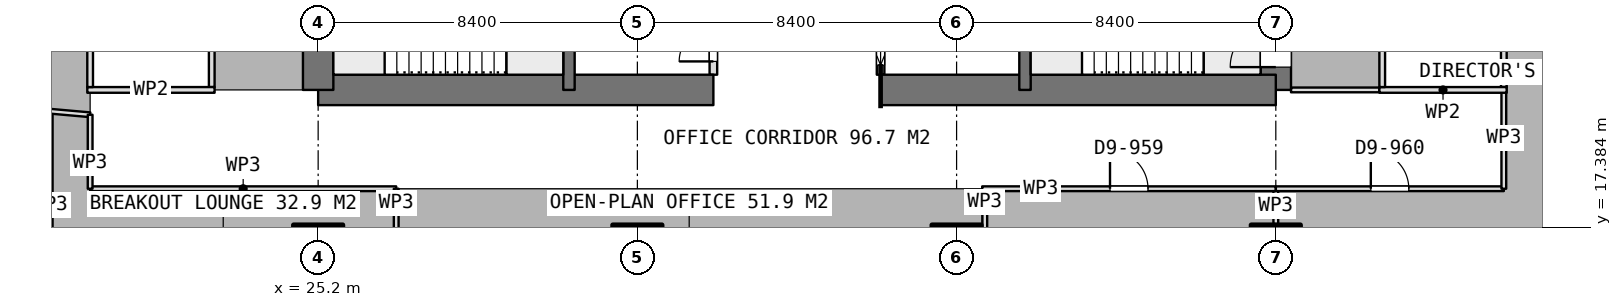
"""IFC4 building model, lengths in metres.
Left out: names, types, materials, properties, quantities, classifications, styles, units other than length and angle.
Written with IfcOpenShell. Run it as: python <this file> out.ifc"""

import sys

from ifc_helpers import new_model, si_unit, direction, frame, frame_2d, origin, origin_2d, place, context, subcontext, project, spatial, rectangle, extrude, element, fill, save


model = new_model("IFC4")
c1 = context("Model", 3, precision=1e-05, world=origin(), true_north=direction((0.0, 1.0)))
c2 = subcontext(c1, "Body", "Model", "MODEL_VIEW")
j1 = project(units=[si_unit("LENGTHUNIT", "METRE"), si_unit("PLANEANGLEUNIT", "RADIAN")], contexts=[c1])
p1 = place(None, origin())
s1 = spatial("IfcSite", under=j1, at=p1, CompositionType="ELEMENT")
p2 = place(p1, origin())
s2 = spatial("IfcBuilding", under=s1, at=p2, CompositionType="ELEMENT")
p3 = place(p2, frame((0.0, 0.0, 257.6)))
s3 = spatial("IfcBuildingStorey", under=s2, at=p3, CompositionType="ELEMENT", Elevation=257.6)
p4 = place(p3, frame((25.2, 21.0, 0.0), z_axis=(0.0, 0.0, 1.0), x_axis=(1.0, 0.0, 0.0)))
e1 = element("IfcWall", 1, at=p4, inside=s3, PredefinedType="SHEAR", context=c2, shape_type="SweptSolid", body=[
    extrude(rectangle(XDim=10.4, YDim=0.8, at=frame_2d((5.2, 0.0))), origin(), (0.0, 0.0, 1.0), 3.75),
])
p5 = place(p3, frame((40.0, 21.0, 0.0), z_axis=(0.0, 0.0, 1.0), x_axis=(1.0, 0.0, 0.0)))
e2 = element("IfcWall", 2, at=p5, inside=s3, PredefinedType="SHEAR", context=c2, shape_type="SweptSolid", body=[
    extrude(rectangle(XDim=10.4, YDim=0.8, at=frame_2d((5.2, 0.0))), origin(), (0.0, 0.0, 1.0), 3.75),
])
p6 = place(p3, frame((25.2, 21.0, 0.0), z_axis=(0.0, 0.0, 1.0), x_axis=(0.0, 1.0, 0.0)))
e3 = element("IfcWall", 3, at=p6, inside=s3, PredefinedType="SHEAR", context=c2, shape_type="SweptSolid", body=[
    extrude(rectangle(XDim=25.2, YDim=0.8, at=frame_2d((12.6, 0.0))), origin(), (0.0, 0.0, 1.0), 3.75),
])
p7 = place(p6, frame((7.8, 0.0, 0.0)))
e4 = element("IfcOpeningElement", 4, at=p7, cuts=e3, PredefinedType="OPENING", context=c2, shape_type="SweptSolid", body=[
    extrude(rectangle(XDim=1.2, YDim=2.1, at=frame_2d((0.6, 1.05))), frame((0.0, 0.41, 0.0), z_axis=(0.0, -1.0, 0.0), x_axis=(1.0, 0.0, 0.0)), (0.0, 0.0, 1.0), 0.82),
])
p8 = place(p6, frame((14.25, 0.0, 0.0)))
e5 = element("IfcOpeningElement", 5, at=p8, cuts=e3, PredefinedType="OPENING", context=c2, shape_type="SweptSolid", body=[
    extrude(rectangle(XDim=0.9, YDim=2.1, at=frame_2d((0.45, 1.05))), frame((0.0, 0.41, 0.0), z_axis=(0.0, -1.0, 0.0), x_axis=(1.0, 0.0, 0.0)), (0.0, 0.0, 1.0), 0.82),
])
p9 = place(p6, frame((16.85, 0.0, 0.0)))
e6 = element("IfcOpeningElement", 6, at=p9, cuts=e3, PredefinedType="OPENING", context=c2, shape_type="SweptSolid", body=[
    extrude(rectangle(XDim=0.9, YDim=2.1, at=frame_2d((0.45, 1.05))), frame((0.0, 0.41, 0.0), z_axis=(0.0, -1.0, 0.0), x_axis=(1.0, 0.0, 0.0)), (0.0, 0.0, 1.0), 0.82),
])
p10 = place(p6, frame((18.95, 0.0, 0.0)))
e7 = element("IfcOpeningElement", 7, at=p10, cuts=e3, PredefinedType="OPENING", context=c2, shape_type="SweptSolid", body=[
    extrude(rectangle(XDim=1.2, YDim=2.1, at=frame_2d((0.6, 1.05))), frame((0.0, 0.41, 0.0), z_axis=(0.0, -1.0, 0.0), x_axis=(1.0, 0.0, 0.0)), (0.0, 0.0, 1.0), 0.82),
])
p11 = place(p3, frame((50.4, 21.0, 0.0), z_axis=(0.0, 0.0, 1.0), x_axis=(0.0, 1.0, 0.0)))
e8 = element("IfcWall", 8, at=p11, inside=s3, PredefinedType="SHEAR", context=c2, shape_type="SweptSolid", body=[
    extrude(rectangle(XDim=25.2, YDim=0.8, at=frame_2d((12.6, 0.0))), origin(), (0.0, 0.0, 1.0), 3.75),
])
p12 = place(p11, frame((16.2, 0.0, 0.0)))
e9 = element("IfcOpeningElement", 9, at=p12, cuts=e8, PredefinedType="OPENING", context=c2, shape_type="SweptSolid", body=[
    extrude(rectangle(XDim=1.2, YDim=2.1, at=frame_2d((0.6, 1.05))), frame((0.0, 0.41, 0.0), z_axis=(0.0, -1.0, 0.0), x_axis=(1.0, 0.0, 0.0)), (0.0, 0.0, 1.0), 0.82),
])
p13 = place(p11, frame((10.05, 0.0, 0.0)))
e10 = element("IfcOpeningElement", 10, at=p13, cuts=e8, PredefinedType="OPENING", context=c2, shape_type="SweptSolid", body=[
    extrude(rectangle(XDim=0.9, YDim=2.1, at=frame_2d((0.45, 1.05))), frame((0.0, 0.41, 0.0), z_axis=(0.0, -1.0, 0.0), x_axis=(1.0, 0.0, 0.0)), (0.0, 0.0, 1.0), 0.82),
])
p14 = place(p11, frame((7.45, 0.0, 0.0)))
e11 = element("IfcOpeningElement", 11, at=p14, cuts=e8, PredefinedType="OPENING", context=c2, shape_type="SweptSolid", body=[
    extrude(rectangle(XDim=0.9, YDim=2.1, at=frame_2d((0.45, 1.05))), frame((0.0, 0.41, 0.0), z_axis=(0.0, -1.0, 0.0), x_axis=(1.0, 0.0, 0.0)), (0.0, 0.0, 1.0), 0.82),
])
p15 = place(p11, frame((0.6, 0.0, 0.0)))
e12 = element("IfcOpeningElement", 12, at=p15, cuts=e8, PredefinedType="OPENING", context=c2, shape_type="SweptSolid", body=[
    extrude(rectangle(XDim=1.2, YDim=2.1, at=frame_2d((0.6, 1.05))), frame((0.0, 0.41, 0.0), z_axis=(0.0, -1.0, 0.0), x_axis=(1.0, 0.0, 0.0)), (0.0, 0.0, 1.0), 0.82),
])
for number, where, z_axis, x_axis in (
    (13, (31.8, 21.0, 0.0), (0.0, 0.0, 1.0), (0.0, 1.0, 0.0)),
    (14, (43.8, 21.0, 0.0), (0.0, 0.0, 1.0), (0.0, 1.0, 0.0)),
):
    element("IfcWall", number, at=place(p3, frame(where, z_axis=z_axis, x_axis=x_axis)), inside=s3, PredefinedType="SHEAR", context=c2, shape_type="SweptSolid", body=[
        extrude(rectangle(XDim=25.2, YDim=0.3, at=frame_2d((12.6, 0.0))), origin(), (0.0, 0.0, 1.0), 3.75),
    ])
for number, where, z_axis, x_axis in (
    (15, (25.2, 16.8, 0.0), (0.0, 0.0, 1.0), (1.0, 0.0, 0.0)),
    (16, (33.6, 16.8, 0.0), (0.0, 0.0, 1.0), (1.0, 0.0, 0.0)),
    (17, (42.0, 16.8, 0.0), (0.0, 0.0, 1.0), (1.0, 0.0, 0.0)),
    (18, (50.4, 16.8, 0.0), (0.0, 0.0, 1.0), (1.0, 0.0, 0.0)),
):
    element("IfcColumn", number, at=place(p3, frame(where, z_axis=z_axis, x_axis=x_axis)), inside=s3, PredefinedType="COLUMN", context=c2, shape_type="SweptSolid", body=[
        extrude(rectangle(XDim=1.3, YDim=1.3, at=origin_2d()), origin(), (0.0, 0.0, 1.0), 3.75),
    ])
p16 = place(p3, frame((40.0, 21.4, 0.0), z_axis=(0.0, 0.0, 1.0), x_axis=(0.0, 1.0, 0.0)))
e19 = element("IfcWall", 19, at=p16, inside=s3, PredefinedType="PARTITIONING", context=c2, shape_type="SweptSolid", body=[
    extrude(rectangle(XDim=1.85, YDim=0.2, at=frame_2d((0.925, 0.0))), origin(), (0.0, 0.0, 1.0), 3.5),
])
p17 = place(p16, frame((0.25, 0.0, 0.0)))
e20 = element("IfcOpeningElement", 20, at=p17, cuts=e19, PredefinedType="OPENING", context=c2, shape_type="SweptSolid", body=[
    extrude(rectangle(XDim=1.1, YDim=2.1, at=frame_2d((0.55, 1.05))), frame((0.0, 0.11, 0.0), z_axis=(0.0, -1.0, 0.0), x_axis=(1.0, 0.0, 0.0)), (0.0, 0.0, 1.0), 0.22),
])
p18 = place(p3, frame((35.6, 21.4, 0.0), z_axis=(0.0, 0.0, 1.0), x_axis=(0.0, 1.0, 0.0)))
e21 = element("IfcWall", 21, at=p18, inside=s3, PredefinedType="PARTITIONING", context=c2, shape_type="SweptSolid", body=[
    extrude(rectangle(XDim=1.85, YDim=0.2, at=frame_2d((0.925, 0.0))), origin(), (0.0, 0.0, 1.0), 3.5),
])
p19 = place(p18, frame((0.35, 0.0, 0.0)))
e22 = element("IfcOpeningElement", 22, at=p19, cuts=e21, PredefinedType="OPENING", context=c2, shape_type="SweptSolid", body=[
    extrude(rectangle(XDim=0.9, YDim=2.1, at=frame_2d((0.45, 1.05))), frame((0.0, 0.11, 0.0), z_axis=(0.0, -1.0, 0.0), x_axis=(1.0, 0.0, 0.0)), (0.0, 0.0, 1.0), 0.22),
])
p20 = place(p3, frame((19.125, 21.0, 0.0), z_axis=(0.0, 0.0, 1.0), x_axis=(1.0, 0.0, 0.0)))
e23 = element("IfcWall", 23, at=p20, inside=s3, PredefinedType="PARTITIONING", context=c2, shape_type="SweptSolid", body=[
    extrude(rectangle(XDim=3.35, YDim=0.15, at=frame_2d((1.675, 0.0))), origin(), (0.0, 0.0, 1.0), 3.5),
])
p21 = place(p3, frame((19.2, 21.075, 0.0), z_axis=(0.0, 0.0, 1.0), x_axis=(0.0, 1.0, 0.0)))
e24 = element("IfcWall", 24, at=p21, inside=s3, PredefinedType="PARTITIONING", context=c2, shape_type="SweptSolid", body=[
    extrude(rectangle(XDim=6.85, YDim=0.15, at=frame_2d((3.425, 0.0))), origin(), (0.0, 0.0, 1.0), 3.5),
])
p22 = place(p3, frame((22.4, 21.075, 0.0), z_axis=(0.0, 0.0, 1.0), x_axis=(0.0, 1.0, 0.0)))
e25 = element("IfcWall", 25, at=p22, inside=s3, PredefinedType="PARTITIONING", context=c2, shape_type="SweptSolid", body=[
    extrude(rectangle(XDim=6.85, YDim=0.15, at=frame_2d((3.425, 0.0))), origin(), (0.0, 0.0, 1.0), 3.5),
])
p23 = place(p22, frame((2.925, 0.0, 0.0)))
e26 = element("IfcOpeningElement", 26, at=p23, cuts=e25, PredefinedType="OPENING", context=c2, shape_type="SweptSolid", body=[
    extrude(rectangle(XDim=1.0, YDim=2.1, at=frame_2d((0.5, 1.05))), frame((0.0, 0.085, 0.0), z_axis=(0.0, -1.0, 0.0), x_axis=(1.0, 0.0, 0.0)), (0.0, 0.0, 1.0), 0.17),
])
p24 = place(p3, frame((53.125, 21.0, 0.0), z_axis=(0.0, 0.0, 1.0), x_axis=(1.0, 0.0, 0.0)))
e27 = element("IfcWall", 27, at=p24, inside=s3, PredefinedType="PARTITIONING", context=c2, shape_type="SweptSolid", body=[
    extrude(rectangle(XDim=3.35, YDim=0.15, at=frame_2d((1.675, 0.0))), origin(), (0.0, 0.0, 1.0), 3.5),
])
p25 = place(p3, frame((53.2, 21.075, 0.0), z_axis=(0.0, 0.0, 1.0), x_axis=(0.0, 1.0, 0.0)))
e28 = element("IfcWall", 28, at=p25, inside=s3, PredefinedType="PARTITIONING", context=c2, shape_type="SweptSolid", body=[
    extrude(rectangle(XDim=6.85, YDim=0.15, at=frame_2d((3.425, 0.0))), origin(), (0.0, 0.0, 1.0), 3.5),
])
p26 = place(p25, frame((2.925, 0.0, 0.0)))
e29 = element("IfcOpeningElement", 29, at=p26, cuts=e28, PredefinedType="OPENING", context=c2, shape_type="SweptSolid", body=[
    extrude(rectangle(XDim=1.0, YDim=2.1, at=frame_2d((0.5, 1.05))), frame((0.0, 0.085, 0.0), z_axis=(0.0, -1.0, 0.0), x_axis=(1.0, 0.0, 0.0)), (0.0, 0.0, 1.0), 0.17),
])
p27 = place(p3, frame((56.4, 21.075, 0.0), z_axis=(0.0, 0.0, 1.0), x_axis=(0.0, 1.0, 0.0)))
e30 = element("IfcWall", 30, at=p27, inside=s3, PredefinedType="PARTITIONING", context=c2, shape_type="SweptSolid", body=[
    extrude(rectangle(XDim=6.85, YDim=0.15, at=frame_2d((3.425, 0.0))), origin(), (0.0, 0.0, 1.0), 3.5),
])
p28 = place(p3, frame((50.4, 18.4, 0.0), z_axis=(0.0, 0.0, 1.0), x_axis=(0.0, -1.0, 0.0)))
e31 = element("IfcWall", 31, at=p28, inside=s3, PredefinedType="PARTITIONING", context=c2, shape_type="SweptSolid", body=[
    extrude(rectangle(XDim=0.93, YDim=0.125, at=frame_2d((0.465, 0.0))), origin(), (0.0, 0.0, 1.0), 3.5),
])
p29 = place(p3, frame((42.742, 15.538, 0.0), z_axis=(0.0, 0.0, 1.0), x_axis=(0.0, 1.0, 0.0)))
e32 = element("IfcWall", 32, at=p29, inside=s3, PredefinedType="PARTITIONING", context=c2, shape_type="SweptSolid", body=[
    extrude(rectangle(XDim=2.799, YDim=0.125, at=frame_2d((1.399, 0.0))), origin(), (0.0, 0.0, 1.0), 3.5),
])
p30 = place(p3, frame((42.674, 18.4, 0.0), z_axis=(0.0, 0.0, 1.0), x_axis=(1.0, 0.0, 0.0)))
e33 = element("IfcWall", 33, at=p30, inside=s3, PredefinedType="PARTITIONING", context=c2, shape_type="SweptSolid", body=[
    extrude(rectangle(XDim=7.726, YDim=0.125, at=frame_2d((3.863, 0.0))), origin(), (0.0, 0.0, 1.0), 3.5),
])
p31 = place(p30, frame((3.363, 0.0, 0.0)))
e34 = element("IfcOpeningElement", 34, at=p31, cuts=e33, PredefinedType="OPENING", context=c2, shape_type="SweptSolid", body=[
    extrude(rectangle(XDim=1.0, YDim=2.1, at=frame_2d((0.5, 1.05))), frame((0.0, 0.073, 0.0), z_axis=(0.0, -1.0, 0.0), x_axis=(1.0, 0.0, 0.0)), (0.0, 0.0, 1.0), 0.145),
])
p32 = place(p3, frame((50.401, 18.4, 0.0), z_axis=(0.0, 0.0, 1.0), x_axis=(1.0, 0.0, 0.0)))
e35 = element("IfcWall", 35, at=p32, inside=s3, PredefinedType="PARTITIONING", context=c2, shape_type="SweptSolid", body=[
    extrude(rectangle(XDim=5.999, YDim=0.125, at=frame_2d((3.0, 0.0))), origin(), (0.0, 0.0, 1.0), 3.5),
])
p33 = place(p32, frame((2.499, 0.0, 0.0)))
e36 = element("IfcOpeningElement", 36, at=p33, cuts=e35, PredefinedType="OPENING", context=c2, shape_type="SweptSolid", body=[
    extrude(rectangle(XDim=1.0, YDim=2.1, at=frame_2d((0.5, 1.05))), frame((0.0, 0.073, 0.0), z_axis=(0.0, -1.0, 0.0), x_axis=(1.0, 0.0, 0.0)), (0.0, 0.0, 1.0), 0.145),
])
p34 = place(p3, frame((56.4, 18.4, 0.0), z_axis=(0.0, 0.0, 1.0), x_axis=(0.0, 1.0, 0.0)))
e37 = element("IfcWall", 37, at=p34, inside=s3, PredefinedType="PARTITIONING", context=c2, shape_type="SweptSolid", body=[
    extrude(rectangle(XDim=2.675, YDim=0.125, at=frame_2d((1.337, 0.0))), origin(), (0.0, 0.0, 1.0), 3.5),
])
p35 = place(p3, frame((53.124, 21.0, 0.0), z_axis=(0.0, 0.0, 1.0), x_axis=(-1.0, 0.0, 0.0)))
e38 = element("IfcWall", 38, at=p35, inside=s3, PredefinedType="PARTITIONING", context=c2, shape_type="SweptSolid", body=[
    extrude(rectangle(XDim=2.324, YDim=0.125, at=frame_2d((1.162, 0.0))), origin(), (0.0, 0.0, 1.0), 3.5),
])
p36 = place(p3, frame((18.149, 20.439, 0.0), z_axis=(0.0, 0.0, 1.0), x_axis=(0.0, -1.0, 0.0)))
e39 = element("IfcWall", 39, at=p36, inside=s3, PredefinedType="PARTITIONING", context=c2, shape_type="SweptSolid", body=[
    extrude(rectangle(XDim=4.939, YDim=0.125, at=frame_2d((2.469, 0.0))), origin(), (0.0, 0.0, 1.0), 3.5),
])
p37 = place(p3, frame((19.2, 18.4, 0.0), z_axis=(0.0, 0.0, 1.0), x_axis=(1.0, 0.0, 0.0)))
e40 = element("IfcWall", 40, at=p37, inside=s3, PredefinedType="PARTITIONING", context=c2, shape_type="SweptSolid", body=[
    extrude(rectangle(XDim=8.054, YDim=0.125, at=frame_2d((4.027, 0.0))), origin(), (0.0, 0.0, 1.0), 3.5),
])
p38 = place(p3, frame((27.254, 18.4, 0.0), z_axis=(0.0, 0.0, 1.0), x_axis=(0.0, -1.0, 0.0)))
e41 = element("IfcWall", 41, at=p38, inside=s3, PredefinedType="PARTITIONING", context=c2, shape_type="SweptSolid", body=[
    extrude(rectangle(XDim=3.705, YDim=0.125, at=frame_2d((1.853, 0.0))), origin(), (0.0, 0.0, 1.0), 3.5),
])
p39 = place(p38, frame((2.153, 0.0, 0.0)))
e42 = element("IfcOpeningElement", 42, at=p39, cuts=e41, PredefinedType="OPENING", context=c2, shape_type="SweptSolid", body=[
    extrude(rectangle(XDim=1.0, YDim=2.1, at=frame_2d((0.5, 1.05))), frame((0.0, 0.073, 0.0), z_axis=(0.0, -1.0, 0.0), x_axis=(1.0, 0.0, 0.0)), (0.0, 0.0, 1.0), 0.145),
])
p40 = place(p3, frame((18.15, 20.439, 0.0), z_axis=(0.0, 0.0, 1.0), x_axis=(0.996099374617, -0.088238517026, 0.0)))
e43 = element("IfcWall", 43, at=p40, inside=s3, PredefinedType="PARTITIONING", context=c2, shape_type="SweptSolid", body=[
    extrude(rectangle(XDim=1.054, YDim=0.125, at=frame_2d((0.527, 0.0))), origin(), (0.0, 0.0, 1.0), 3.5),
])
p41 = place(p3, frame((19.2, 20.346, 0.0), z_axis=(0.0, 0.0, 1.0), x_axis=(0.0, -1.0, 0.0)))
e44 = element("IfcWall", 44, at=p41, inside=s3, PredefinedType="PARTITIONING", context=c2, shape_type="SweptSolid", body=[
    extrude(rectangle(XDim=1.946, YDim=0.125, at=frame_2d((0.973, 0.0))), origin(), (0.0, 0.0, 1.0), 3.5),
])
p42 = place(p17, origin())
e45 = element("IfcDoor", 45, at=p42, inside=s3, OperationType="SLIDING_TO_LEFT", PredefinedType="DOOR", context=c2, shape_type="SweptSolid", body=[
    extrude(rectangle(XDim=1.1, YDim=2.1, at=frame_2d((0.55, 1.05))), frame((0.0, 0.025, 0.0), z_axis=(0.0, -1.0, 0.0), x_axis=(1.0, 0.0, 0.0)), (0.0, 0.0, 1.0), 0.05),
])
fill(e20, e45)
p43 = place(p19, origin())
e46 = element("IfcDoor", 46, at=p43, inside=s3, OperationType="SINGLE_SWING_LEFT", PredefinedType="DOOR", context=c2, shape_type="SweptSolid", body=[
    extrude(rectangle(XDim=0.9, YDim=2.1, at=frame_2d((0.45, 1.05))), frame((0.0, 0.025, 0.0), z_axis=(0.0, -1.0, 0.0), x_axis=(1.0, 0.0, 0.0)), (0.0, 0.0, 1.0), 0.05),
])
fill(e22, e46)
p44 = place(p31, origin())
e47 = element("IfcDoor", 47, at=p44, inside=s3, OperationType="SINGLE_SWING_LEFT", PredefinedType="DOOR", context=c2, shape_type="SweptSolid", body=[
    extrude(rectangle(XDim=1.0, YDim=2.1, at=frame_2d((0.5, 1.05))), frame((0.0, 0.025, 0.0), z_axis=(0.0, -1.0, 0.0), x_axis=(1.0, 0.0, 0.0)), (0.0, 0.0, 1.0), 0.05),
])
fill(e34, e47)
p45 = place(p33, origin())
e48 = element("IfcDoor", 48, at=p45, inside=s3, OperationType="SINGLE_SWING_LEFT", PredefinedType="DOOR", context=c2, shape_type="SweptSolid", body=[
    extrude(rectangle(XDim=1.0, YDim=2.1, at=frame_2d((0.5, 1.05))), frame((0.0, 0.025, 0.0), z_axis=(0.0, -1.0, 0.0), x_axis=(1.0, 0.0, 0.0)), (0.0, 0.0, 1.0), 0.05),
])
fill(e36, e48)
p46 = place(p15, origin())
e49 = element("IfcDoor", 49, at=p46, inside=s3, OperationType="SINGLE_SWING_RIGHT", PredefinedType="DOOR", context=c2, shape_type="SweptSolid", body=[
    extrude(rectangle(XDim=1.2, YDim=2.1, at=frame_2d((0.6, 1.05))), frame((0.0, 0.025, 0.0), z_axis=(0.0, -1.0, 0.0), x_axis=(1.0, 0.0, 0.0)), (0.0, 0.0, 1.0), 0.05),
])
fill(e12, e49)
save(model, sys.argv[1])
